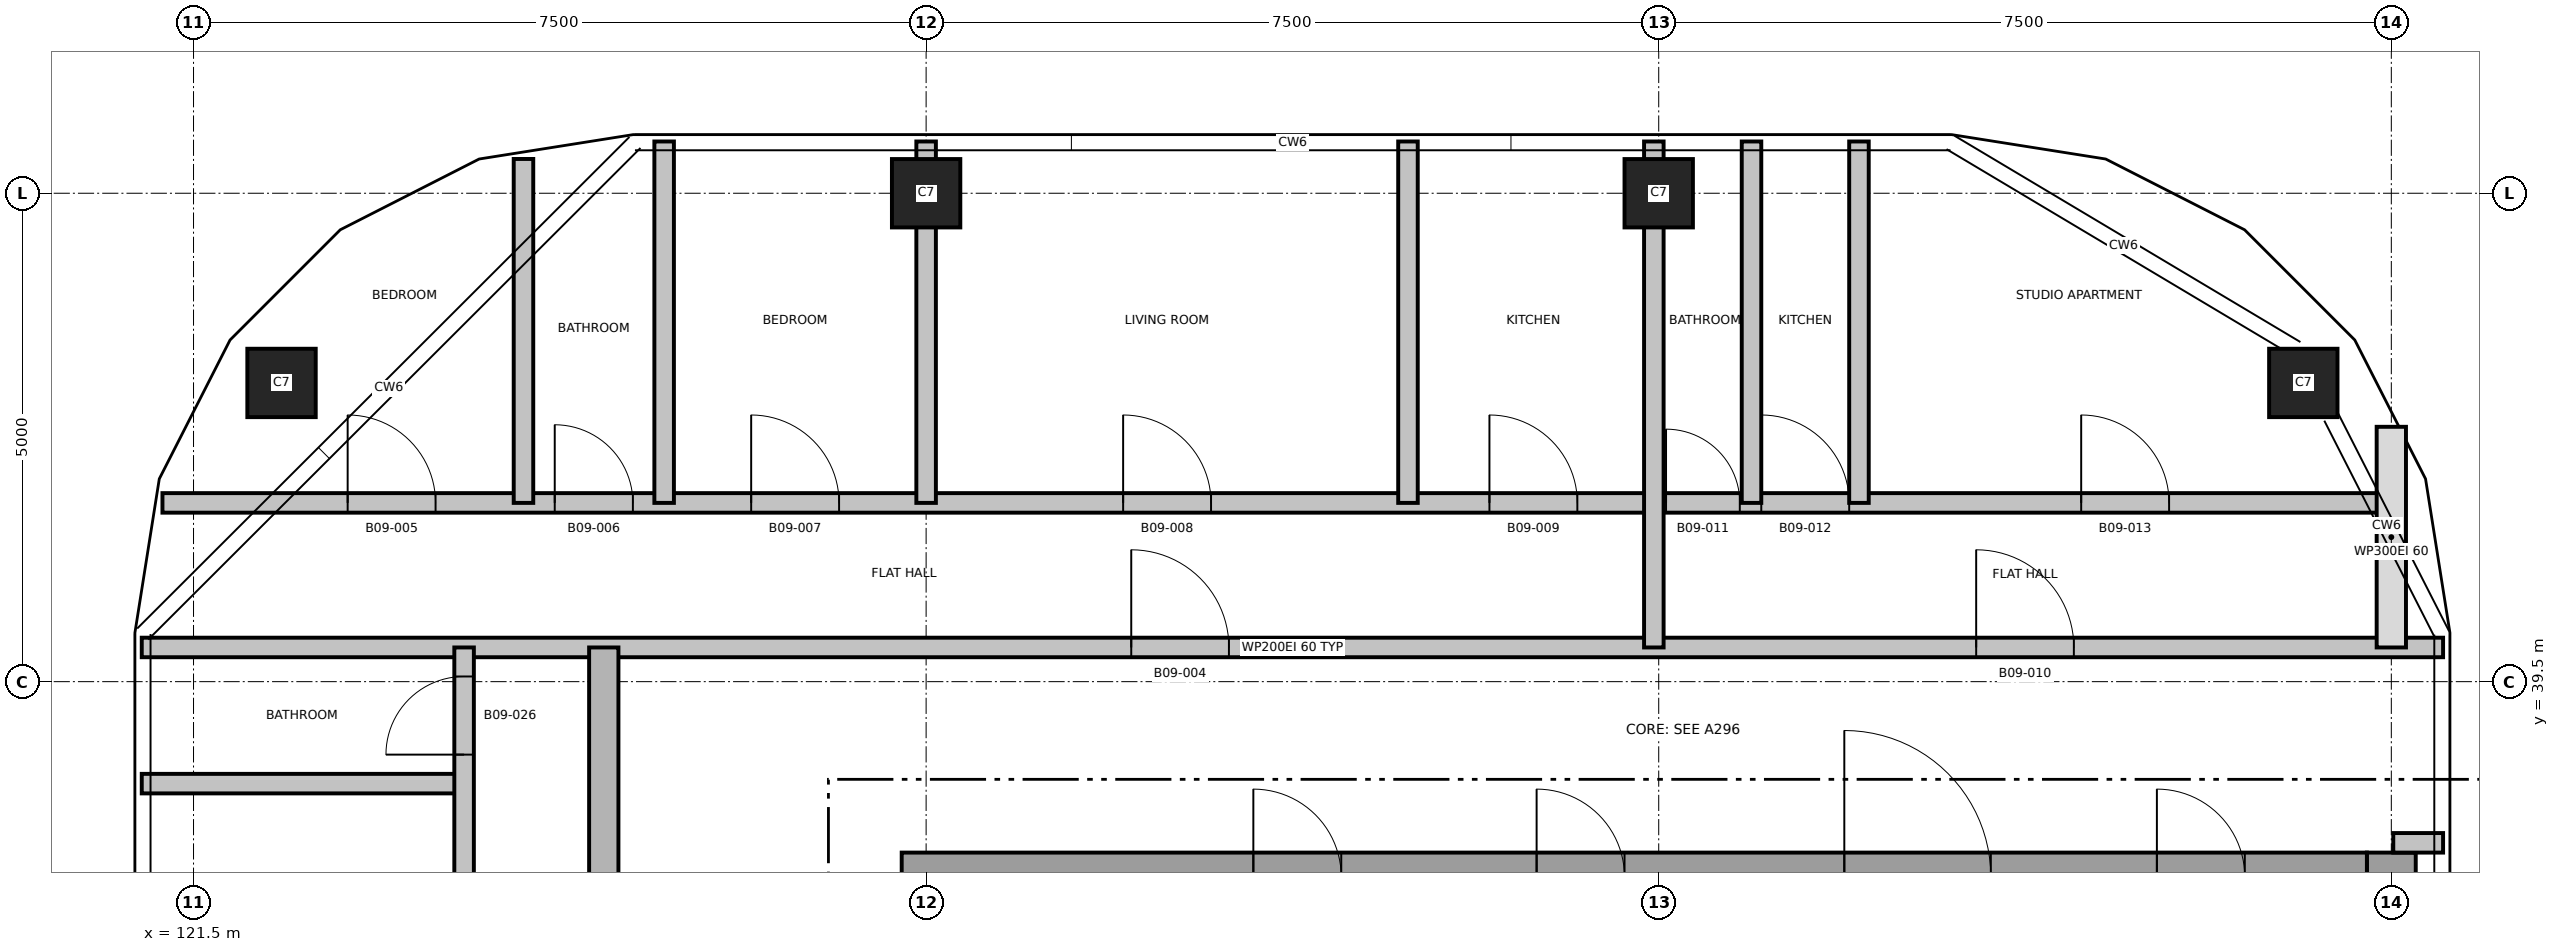
"""IFC4 building model, lengths in metres.
Left out: names, types, materials, properties, quantities, classifications, styles, units other than length and angle.
Written with IfcOpenShell. Run it as: python <this file> out.ifc"""

import sys

from ifc_helpers import new_model, si_unit, direction, frame, frame_2d, origin, origin_2d, place, context, subcontext, project, spatial, rectangle, extrude, element, fill, save


model = new_model("IFC4")
c1 = context("Model", 3, precision=1e-05, world=origin(), true_north=direction((0.0, 1.0)))
c2 = subcontext(c1, "Body", "Model", "MODEL_VIEW")
j1 = project(units=[si_unit("LENGTHUNIT", "METRE"), si_unit("PLANEANGLEUNIT", "RADIAN")], contexts=[c1])
p1 = place(None, origin())
s1 = spatial("IfcSite", under=j1, at=p1, CompositionType="ELEMENT")
p2 = place(p1, origin())
s2 = spatial("IfcBuilding", under=s1, at=p2, CompositionType="ELEMENT")
p3 = place(p2, frame((0.0, 0.0, 98.2)))
s3 = spatial("IfcBuildingStorey", under=s2, at=p3, CompositionType="ELEMENT", Elevation=98.2)
p4 = place(p3, frame((144.0, 24.25, 0.0), z_axis=(0.0, 0.0, 1.0), x_axis=(0.0, 1.0, 0.0)))
e1 = element("IfcWall", 1, at=p4, inside=s3, PredefinedType="SHEAR", context=c2, shape_type="SweptSolid", body=[
    extrude(rectangle(XDim=13.5, YDim=0.5, at=frame_2d((6.75, 0.0))), origin(), (0.0, 0.0, 1.0), 3.7),
])
p5 = place(p3, frame((128.75, 37.5, 0.0), z_axis=(0.0, 0.0, 1.0), x_axis=(1.0, 0.0, 0.0)))
e2 = element("IfcWall", 2, at=p5, inside=s3, PredefinedType="SHEAR", context=c2, shape_type="SweptSolid", body=[
    extrude(rectangle(XDim=15.0, YDim=0.5, at=frame_2d((7.5, 0.0))), origin(), (0.0, 0.0, 1.0), 3.7),
])
p6 = place(p5, frame((9.65, 0.0, 0.0)))
e3 = element("IfcOpeningElement", 3, at=p6, cuts=e2, PredefinedType="OPENING", context=c2, shape_type="SweptSolid", body=[
    extrude(rectangle(XDim=1.5, YDim=2.1, at=frame_2d((0.75, 1.05))), frame((0.0, 0.26, 0.0), z_axis=(0.0, -1.0, 0.0), x_axis=(1.0, 0.0, 0.0)), (0.0, 0.0, 1.0), 0.52),
])
p7 = place(p5, frame((12.85, 0.0, 0.0)))
e4 = element("IfcOpeningElement", 4, at=p7, cuts=e2, PredefinedType="OPENING", context=c2, shape_type="SweptSolid", body=[
    extrude(rectangle(XDim=0.9, YDim=2.1, at=frame_2d((0.45, 1.05))), frame((0.0, 0.26, 0.0), z_axis=(0.0, -1.0, 0.0), x_axis=(1.0, 0.0, 0.0)), (0.0, 0.0, 1.0), 0.52),
])
p8 = place(p5, frame((3.6, 0.0, 0.0)))
e5 = element("IfcOpeningElement", 5, at=p8, cuts=e2, PredefinedType="OPENING", context=c2, shape_type="SweptSolid", body=[
    extrude(rectangle(XDim=0.9, YDim=2.1, at=frame_2d((0.45, 1.05))), frame((0.0, 0.26, 0.0), z_axis=(0.0, -1.0, 0.0), x_axis=(1.0, 0.0, 0.0)), (0.0, 0.0, 1.0), 0.52),
])
p9 = place(p5, frame((6.5, 0.0, 0.0)))
e6 = element("IfcOpeningElement", 6, at=p9, cuts=e2, PredefinedType="OPENING", context=c2, shape_type="SweptSolid", body=[
    extrude(rectangle(XDim=0.9, YDim=2.1, at=frame_2d((0.45, 1.05))), frame((0.0, 0.26, 0.0), z_axis=(0.0, -1.0, 0.0), x_axis=(1.0, 0.0, 0.0)), (0.0, 0.0, 1.0), 0.52),
])
for number, where, z_axis, x_axis in (
    (7, (122.401, 42.558, 0.0), (0.0, 0.0, 1.0), (1.0, 0.0, 0.0)),
    (8, (143.099, 42.558, 0.0), (0.0, 0.0, 1.0), (1.0, 0.0, 0.0)),
    (9, (129.0, 44.5, 0.0), (0.0, 0.0, 1.0), (1.0, 0.0, 0.0)),
    (10, (136.5, 44.5, 0.0), (0.0, 0.0, 1.0), (1.0, 0.0, 0.0)),
):
    element("IfcColumn", number, at=place(p3, frame(where, z_axis=z_axis, x_axis=x_axis)), inside=s3, PredefinedType="COLUMN", context=c2, shape_type="SweptSolid", body=[
        extrude(rectangle(XDim=0.7, YDim=0.7, at=origin_2d()), origin(), (0.0, 0.0, 1.0), 3.7),
    ])
p10 = place(p3, frame((144.02, 37.85, 0.0), z_axis=(0.0, 0.0, 1.0), x_axis=(1.0, 0.0, 0.0)))
e11 = element("IfcWall", 11, at=p10, inside=s3, PredefinedType="PARTITIONING", context=c2, shape_type="SweptSolid", body=[
    extrude(rectangle(XDim=0.51, YDim=0.2, at=frame_2d((0.255, 0.0))), origin(), (0.0, 0.0, 1.0), 3.4),
])
p11 = place(p3, frame((120.97, 38.456, 0.0), z_axis=(0.0, 0.0, 1.0), x_axis=(1.0, 0.0, 0.0)))
e12 = element("IfcWall", 12, at=p11, inside=s3, PredefinedType="PARTITIONING", context=c2, shape_type="SweptSolid", body=[
    extrude(rectangle(XDim=3.3, YDim=0.2, at=frame_2d((1.65, 0.0))), origin(), (0.0, 0.0, 1.0), 3.4),
])
p12 = place(p3, frame((120.97, 39.85, 0.0), z_axis=(0.0, 0.0, 1.0), x_axis=(1.0, 0.0, 0.0)))
e13 = element("IfcWall", 13, at=p12, inside=s3, PredefinedType="PARTITIONING", context=c2, shape_type="SweptSolid", body=[
    extrude(rectangle(XDim=23.56, YDim=0.2, at=frame_2d((11.78, 0.0))), origin(), (0.0, 0.0, 1.0), 3.4),
])
p13 = place(p12, frame((10.13, 0.0, 0.0)))
e14 = element("IfcOpeningElement", 14, at=p13, cuts=e13, PredefinedType="OPENING", context=c2, shape_type="SweptSolid", body=[
    extrude(rectangle(XDim=1.0, YDim=2.1, at=frame_2d((0.5, 1.05))), frame((0.0, 0.11, 0.0), z_axis=(0.0, -1.0, 0.0), x_axis=(1.0, 0.0, 0.0)), (0.0, 0.0, 1.0), 0.22),
])
p14 = place(p12, frame((18.78, 0.0, 0.0)))
e15 = element("IfcOpeningElement", 15, at=p14, cuts=e13, PredefinedType="OPENING", context=c2, shape_type="SweptSolid", body=[
    extrude(rectangle(XDim=1.0, YDim=2.1, at=frame_2d((0.5, 1.05))), frame((0.0, 0.11, 0.0), z_axis=(0.0, -1.0, 0.0), x_axis=(1.0, 0.0, 0.0)), (0.0, 0.0, 1.0), 0.22),
])
p15 = place(p3, frame((121.182, 41.33, 0.0), z_axis=(0.0, 0.0, 1.0), x_axis=(1.0, 0.0, 0.0)))
e16 = element("IfcWall", 16, at=p15, inside=s3, PredefinedType="PARTITIONING", context=c2, shape_type="SweptSolid", body=[
    extrude(rectangle(XDim=22.818, YDim=0.2, at=frame_2d((11.409, 0.0))), origin(), (0.0, 0.0, 1.0), 3.4),
])
p16 = place(p15, frame((1.896, 0.0, 0.0)))
e17 = element("IfcOpeningElement", 17, at=p16, cuts=e16, PredefinedType="OPENING", context=c2, shape_type="SweptSolid", body=[
    extrude(rectangle(XDim=0.9, YDim=2.1, at=frame_2d((0.45, 1.05))), frame((0.0, 0.11, 0.0), z_axis=(0.0, -1.0, 0.0), x_axis=(1.0, 0.0, 0.0)), (0.0, 0.0, 1.0), 0.22),
])
p17 = place(p15, frame((4.016, 0.0, 0.0)))
e18 = element("IfcOpeningElement", 18, at=p17, cuts=e16, PredefinedType="OPENING", context=c2, shape_type="SweptSolid", body=[
    extrude(rectangle(XDim=0.8, YDim=2.1, at=frame_2d((0.4, 1.05))), frame((0.0, 0.11, 0.0), z_axis=(0.0, -1.0, 0.0), x_axis=(1.0, 0.0, 0.0)), (0.0, 0.0, 1.0), 0.22),
])
p18 = place(p15, frame((6.027, 0.0, 0.0)))
e19 = element("IfcOpeningElement", 19, at=p18, cuts=e16, PredefinedType="OPENING", context=c2, shape_type="SweptSolid", body=[
    extrude(rectangle(XDim=0.9, YDim=2.1, at=frame_2d((0.45, 1.05))), frame((0.0, 0.11, 0.0), z_axis=(0.0, -1.0, 0.0), x_axis=(1.0, 0.0, 0.0)), (0.0, 0.0, 1.0), 0.22),
])
p19 = place(p15, frame((9.835, 0.0, 0.0)))
e20 = element("IfcOpeningElement", 20, at=p19, cuts=e16, PredefinedType="OPENING", context=c2, shape_type="SweptSolid", body=[
    extrude(rectangle(XDim=0.9, YDim=2.1, at=frame_2d((0.45, 1.05))), frame((0.0, 0.11, 0.0), z_axis=(0.0, -1.0, 0.0), x_axis=(1.0, 0.0, 0.0)), (0.0, 0.0, 1.0), 0.22),
])
p20 = place(p15, frame((13.585, 0.0, 0.0)))
e21 = element("IfcOpeningElement", 21, at=p20, cuts=e16, PredefinedType="OPENING", context=c2, shape_type="SweptSolid", body=[
    extrude(rectangle(XDim=0.9, YDim=2.1, at=frame_2d((0.45, 1.05))), frame((0.0, 0.11, 0.0), z_axis=(0.0, -1.0, 0.0), x_axis=(1.0, 0.0, 0.0)), (0.0, 0.0, 1.0), 0.22),
])
p21 = place(p15, frame((15.393, 0.0, 0.0)))
e22 = element("IfcOpeningElement", 22, at=p21, cuts=e16, PredefinedType="OPENING", context=c2, shape_type="SweptSolid", body=[
    extrude(rectangle(XDim=0.755, YDim=2.1, at=frame_2d((0.377, 1.05))), frame((0.0, 0.11, 0.0), z_axis=(0.0, -1.0, 0.0), x_axis=(1.0, 0.0, 0.0)), (0.0, 0.0, 1.0), 0.22),
])
p22 = place(p15, frame((16.368, 0.0, 0.0)))
e23 = element("IfcOpeningElement", 23, at=p22, cuts=e16, PredefinedType="OPENING", context=c2, shape_type="SweptSolid", body=[
    extrude(rectangle(XDim=0.9, YDim=2.1, at=frame_2d((0.45, 1.05))), frame((0.0, 0.11, 0.0), z_axis=(0.0, -1.0, 0.0), x_axis=(1.0, 0.0, 0.0)), (0.0, 0.0, 1.0), 0.22),
])
p23 = place(p15, frame((19.643, 0.0, 0.0)))
e24 = element("IfcOpeningElement", 24, at=p23, cuts=e16, PredefinedType="OPENING", context=c2, shape_type="SweptSolid", body=[
    extrude(rectangle(XDim=0.9, YDim=2.1, at=frame_2d((0.45, 1.05))), frame((0.0, 0.11, 0.0), z_axis=(0.0, -1.0, 0.0), x_axis=(1.0, 0.0, 0.0)), (0.0, 0.0, 1.0), 0.22),
])
p24 = place(p3, frame((124.27, 22.15, 0.0), z_axis=(0.0, 0.0, 1.0), x_axis=(0.0, 1.0, 0.0)))
e25 = element("IfcWall", 25, at=p24, inside=s3, PredefinedType="PARTITIONING", context=c2, shape_type="SweptSolid", body=[
    extrude(rectangle(XDim=17.7, YDim=0.2, at=frame_2d((8.85, 0.0))), origin(), (0.0, 0.0, 1.0), 3.4),
])
p25 = place(p24, frame((1.725, 0.0, 0.0)))
e26 = element("IfcOpeningElement", 26, at=p25, cuts=e25, PredefinedType="OPENING", context=c2, shape_type="SweptSolid", body=[
    extrude(rectangle(XDim=0.9, YDim=2.1, at=frame_2d((0.45, 1.05))), frame((0.0, 0.11, 0.0), z_axis=(0.0, -1.0, 0.0), x_axis=(1.0, 0.0, 0.0)), (0.0, 0.0, 1.0), 0.22),
])
p26 = place(p24, frame((6.867, 0.0, 0.0)))
e27 = element("IfcOpeningElement", 27, at=p26, cuts=e25, PredefinedType="OPENING", context=c2, shape_type="SweptSolid", body=[
    extrude(rectangle(XDim=0.9, YDim=2.1, at=frame_2d((0.45, 1.05))), frame((0.0, 0.11, 0.0), z_axis=(0.0, -1.0, 0.0), x_axis=(1.0, 0.0, 0.0)), (0.0, 0.0, 1.0), 0.22),
])
p27 = place(p24, frame((11.367, 0.0, 0.0)))
e28 = element("IfcOpeningElement", 28, at=p27, cuts=e25, PredefinedType="OPENING", context=c2, shape_type="SweptSolid", body=[
    extrude(rectangle(XDim=0.9, YDim=2.1, at=frame_2d((0.45, 1.05))), frame((0.0, 0.11, 0.0), z_axis=(0.0, -1.0, 0.0), x_axis=(1.0, 0.0, 0.0)), (0.0, 0.0, 1.0), 0.22),
])
p28 = place(p24, frame((14.378, 0.0, 0.0)))
e29 = element("IfcOpeningElement", 29, at=p28, cuts=e25, PredefinedType="OPENING", context=c2, shape_type="SweptSolid", body=[
    extrude(rectangle(XDim=0.9, YDim=2.1, at=frame_2d((0.45, 1.05))), frame((0.0, 0.11, 0.0), z_axis=(0.0, -1.0, 0.0), x_axis=(1.0, 0.0, 0.0)), (0.0, 0.0, 1.0), 0.22),
])
p29 = place(p24, frame((16.603, 0.0, 0.0)))
e30 = element("IfcOpeningElement", 30, at=p29, cuts=e25, PredefinedType="OPENING", context=c2, shape_type="SweptSolid", body=[
    extrude(rectangle(XDim=0.8, YDim=2.1, at=frame_2d((0.4, 1.05))), frame((0.0, 0.11, 0.0), z_axis=(0.0, -1.0, 0.0), x_axis=(1.0, 0.0, 0.0)), (0.0, 0.0, 1.0), 0.22),
])
p30 = place(p3, frame((124.878, 41.33, 0.0), z_axis=(0.0, 0.0, 1.0), x_axis=(0.0, 1.0, 0.0)))
e31 = element("IfcWall", 31, at=p30, inside=s3, PredefinedType="PARTITIONING", context=c2, shape_type="SweptSolid", body=[
    extrude(rectangle(XDim=3.521, YDim=0.2, at=frame_2d((1.76, 0.0))), origin(), (0.0, 0.0, 1.0), 3.4),
])
p31 = place(p3, frame((125.7, 22.15, 0.0), z_axis=(0.0, 0.0, 1.0), x_axis=(0.0, 1.0, 0.0)))
e32 = element("IfcWall", 32, at=p31, inside=s3, PredefinedType="SHEAR", context=c2, shape_type="SweptSolid", body=[
    extrude(rectangle(XDim=17.7, YDim=0.3, at=frame_2d((8.85, 0.0))), origin(), (0.0, 0.0, 1.0), 3.4),
])
p32 = place(p31, frame((2.7, 0.0, 0.0)))
e33 = element("IfcOpeningElement", 33, at=p32, cuts=e32, PredefinedType="OPENING", context=c2, shape_type="SweptSolid", body=[
    extrude(rectangle(XDim=1.0, YDim=2.1, at=frame_2d((0.5, 1.05))), frame((0.0, 0.16, 0.0), z_axis=(0.0, -1.0, 0.0), x_axis=(1.0, 0.0, 0.0)), (0.0, 0.0, 1.0), 0.32),
])
for number, where, z_axis, x_axis in (
    (34, (126.318, 41.33, 0.0), (0.0, 0.0, 1.0), (0.0, 1.0, 0.0)),
    (35, (129.0, 41.33, 0.0), (0.0, 0.0, 1.0), (0.0, 1.0, 0.0)),
    (36, (133.933, 41.33, 0.0), (0.0, 0.0, 1.0), (0.0, 1.0, 0.0)),
):
    element("IfcWall", number, at=place(p3, frame(where, z_axis=z_axis, x_axis=x_axis)), inside=s3, PredefinedType="PARTITIONING", context=c2, shape_type="SweptSolid", body=[
        extrude(rectangle(XDim=3.7, YDim=0.2, at=frame_2d((1.85, 0.0))), origin(), (0.0, 0.0, 1.0), 3.4),
    ])
p33 = place(p3, frame((136.45, 39.85, 0.0), z_axis=(0.0, 0.0, 1.0), x_axis=(0.0, 1.0, 0.0)))
e37 = element("IfcWall", 37, at=p33, inside=s3, PredefinedType="PARTITIONING", context=c2, shape_type="SweptSolid", body=[
    extrude(rectangle(XDim=5.18, YDim=0.2, at=frame_2d((2.59, 0.0))), origin(), (0.0, 0.0, 1.0), 3.4),
])
for number, where, z_axis, x_axis in (
    (38, (137.45, 41.33, 0.0), (0.0, 0.0, 1.0), (0.0, 1.0, 0.0)),
    (39, (138.55, 41.33, 0.0), (0.0, 0.0, 1.0), (0.0, 1.0, 0.0)),
):
    element("IfcWall", number, at=place(p3, frame(where, z_axis=z_axis, x_axis=x_axis)), inside=s3, PredefinedType="PARTITIONING", context=c2, shape_type="SweptSolid", body=[
        extrude(rectangle(XDim=3.7, YDim=0.2, at=frame_2d((1.85, 0.0))), origin(), (0.0, 0.0, 1.0), 3.4),
    ])
p34 = place(p3, frame((144.0, 39.85, 0.0), z_axis=(0.0, 0.0, 1.0), x_axis=(0.0, 1.0, 0.0)))
e40 = element("IfcWall", 40, at=p34, inside=s3, PredefinedType="PARTITIONING", context=c2, shape_type="SweptSolid", body=[
    extrude(rectangle(XDim=2.259, YDim=0.3, at=frame_2d((1.129, 0.0))), origin(), (0.0, 0.0, 1.0), 3.4),
])
p35 = place(p13, origin())
e41 = element("IfcDoor", 41, at=p35, inside=s3, OperationType="SINGLE_SWING_RIGHT", PredefinedType="DOOR", context=c2, shape_type="SweptSolid", body=[
    extrude(rectangle(XDim=1.0, YDim=2.1, at=frame_2d((0.5, 1.05))), frame((0.0, 0.025, 0.0), z_axis=(0.0, -1.0, 0.0), x_axis=(1.0, 0.0, 0.0)), (0.0, 0.0, 1.0), 0.05),
])
fill(e14, e41)
p36 = place(p16, origin())
e42 = element("IfcDoor", 42, at=p36, inside=s3, OperationType="SINGLE_SWING_LEFT", PredefinedType="DOOR", context=c2, shape_type="SweptSolid", body=[
    extrude(rectangle(XDim=0.9, YDim=2.1, at=frame_2d((0.45, 1.05))), frame((0.0, 0.025, 0.0), z_axis=(0.0, -1.0, 0.0), x_axis=(1.0, 0.0, 0.0)), (0.0, 0.0, 1.0), 0.05),
])
fill(e17, e42)
p37 = place(p17, origin())
e43 = element("IfcDoor", 43, at=p37, inside=s3, OperationType="SINGLE_SWING_RIGHT", PredefinedType="DOOR", context=c2, shape_type="SweptSolid", body=[
    extrude(rectangle(XDim=0.8, YDim=2.1, at=frame_2d((0.4, 1.05))), frame((0.0, 0.025, 0.0), z_axis=(0.0, -1.0, 0.0), x_axis=(1.0, 0.0, 0.0)), (0.0, 0.0, 1.0), 0.05),
])
fill(e18, e43)
p38 = place(p18, origin())
e44 = element("IfcDoor", 44, at=p38, inside=s3, OperationType="SINGLE_SWING_LEFT", PredefinedType="DOOR", context=c2, shape_type="SweptSolid", body=[
    extrude(rectangle(XDim=0.9, YDim=2.1, at=frame_2d((0.45, 1.05))), frame((0.0, 0.025, 0.0), z_axis=(0.0, -1.0, 0.0), x_axis=(1.0, 0.0, 0.0)), (0.0, 0.0, 1.0), 0.05),
])
fill(e19, e44)
p39 = place(p19, origin())
e45 = element("IfcDoor", 45, at=p39, inside=s3, OperationType="SINGLE_SWING_RIGHT", PredefinedType="DOOR", context=c2, shape_type="SweptSolid", body=[
    extrude(rectangle(XDim=0.9, YDim=2.1, at=frame_2d((0.45, 1.05))), frame((0.0, 0.025, 0.0), z_axis=(0.0, -1.0, 0.0), x_axis=(1.0, 0.0, 0.0)), (0.0, 0.0, 1.0), 0.05),
])
fill(e20, e45)
p40 = place(p20, origin())
e46 = element("IfcDoor", 46, at=p40, inside=s3, OperationType="SINGLE_SWING_LEFT", PredefinedType="DOOR", context=c2, shape_type="SweptSolid", body=[
    extrude(rectangle(XDim=0.9, YDim=2.1, at=frame_2d((0.45, 1.05))), frame((0.0, 0.025, 0.0), z_axis=(0.0, -1.0, 0.0), x_axis=(1.0, 0.0, 0.0)), (0.0, 0.0, 1.0), 0.05),
])
fill(e21, e46)
p41 = place(p14, origin())
e47 = element("IfcDoor", 47, at=p41, inside=s3, OperationType="SINGLE_SWING_RIGHT", PredefinedType="DOOR", context=c2, shape_type="SweptSolid", body=[
    extrude(rectangle(XDim=1.0, YDim=2.1, at=frame_2d((0.5, 1.05))), frame((0.0, 0.025, 0.0), z_axis=(0.0, -1.0, 0.0), x_axis=(1.0, 0.0, 0.0)), (0.0, 0.0, 1.0), 0.05),
])
fill(e15, e47)
p42 = place(p21, origin())
e48 = element("IfcDoor", 48, at=p42, inside=s3, OperationType="SINGLE_SWING_LEFT", PredefinedType="DOOR", context=c2, shape_type="SweptSolid", body=[
    extrude(rectangle(XDim=0.755, YDim=2.1, at=frame_2d((0.377, 1.05))), frame((0.0, 0.025, 0.0), z_axis=(0.0, -1.0, 0.0), x_axis=(1.0, 0.0, 0.0)), (0.0, 0.0, 1.0), 0.05),
])
fill(e22, e48)
p43 = place(p22, origin())
e49 = element("IfcDoor", 49, at=p43, inside=s3, OperationType="SINGLE_SWING_RIGHT", PredefinedType="DOOR", context=c2, shape_type="SweptSolid", body=[
    extrude(rectangle(XDim=0.9, YDim=2.1, at=frame_2d((0.45, 1.05))), frame((0.0, 0.025, 0.0), z_axis=(0.0, -1.0, 0.0), x_axis=(1.0, 0.0, 0.0)), (0.0, 0.0, 1.0), 0.05),
])
fill(e23, e49)
p44 = place(p23, origin())
e50 = element("IfcDoor", 50, at=p44, inside=s3, OperationType="SINGLE_SWING_LEFT", PredefinedType="DOOR", context=c2, shape_type="SweptSolid", body=[
    extrude(rectangle(XDim=0.9, YDim=2.1, at=frame_2d((0.45, 1.05))), frame((0.0, 0.025, 0.0), z_axis=(0.0, -1.0, 0.0), x_axis=(1.0, 0.0, 0.0)), (0.0, 0.0, 1.0), 0.05),
])
fill(e24, e50)
p45 = place(p29, origin())
e51 = element("IfcDoor", 51, at=p45, inside=s3, OperationType="SINGLE_SWING_RIGHT", PredefinedType="DOOR", context=c2, shape_type="SweptSolid", body=[
    extrude(rectangle(XDim=0.8, YDim=2.1, at=frame_2d((0.4, 1.05))), frame((0.0, 0.025, 0.0), z_axis=(0.0, -1.0, 0.0), x_axis=(1.0, 0.0, 0.0)), (0.0, 0.0, 1.0), 0.05),
])
fill(e30, e51)
save(model, sys.argv[1])
